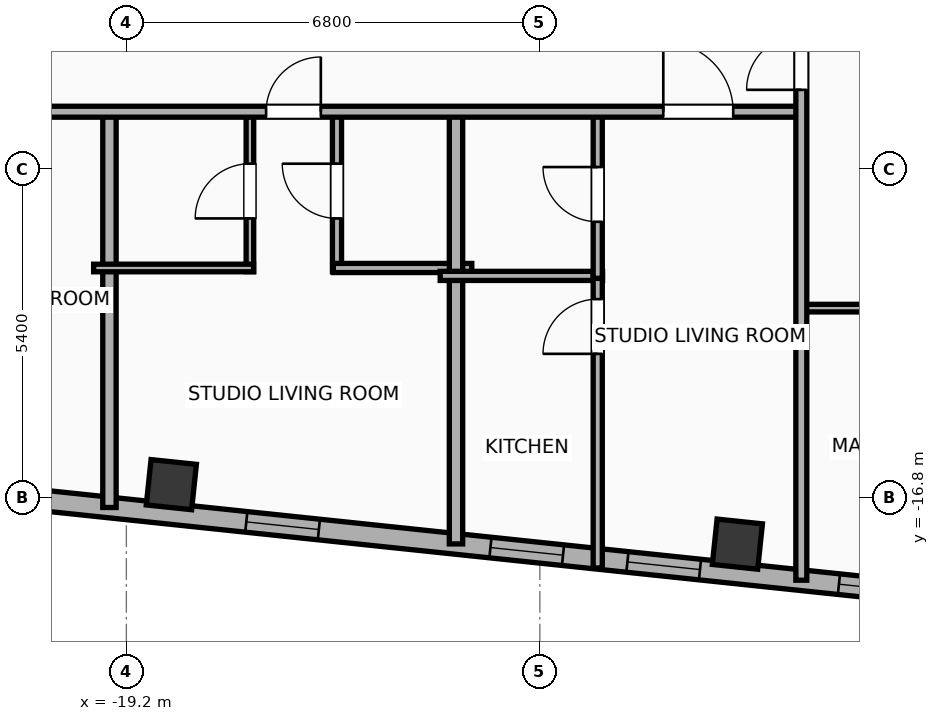
"""IFC4 building model, lengths in metres.
Left out: names, types, materials, properties, quantities, classifications, styles, units other than length and angle.
Written with IfcOpenShell. Run it as: python <this file> out.ifc"""

import sys

from ifc_helpers import new_model, si_unit, direction, frame, frame_2d, origin, origin_2d, place, context, subcontext, project, spatial, rectangle, hollow_rectangle, extrude, element, fill, save


model = new_model("IFC4")
c1 = context("Model", 3, precision=1e-05, world=origin(), true_north=direction((0.0, 1.0)))
c2 = subcontext(c1, "Body", "Model", "MODEL_VIEW")
j1 = project(units=[si_unit("LENGTHUNIT", "METRE"), si_unit("PLANEANGLEUNIT", "RADIAN")], contexts=[c1])
p1 = place(None, origin())
s1 = spatial("IfcSite", under=j1, at=p1, CompositionType="ELEMENT")
p2 = place(p1, origin())
s2 = spatial("IfcBuilding", under=s1, at=p2, CompositionType="ELEMENT")
p3 = place(p2, frame((0.0, 0.0, 302.9)))
s3 = spatial("IfcBuildingStorey", under=s2, at=p3, CompositionType="ELEMENT", Elevation=302.9)
for number, where, z_axis, x_axis in (
    (1, (-18.46, -16.583, 0.0), (0.0, 0.0, 1.0), (0.995, -0.105, 0.0)),
    (2, (-9.152, -17.561, 0.0), (0.0, 0.0, 1.0), (0.995, -0.105, 0.0)),
):
    element("IfcColumn", number, at=place(p3, frame(where, z_axis=z_axis, x_axis=x_axis)), inside=s3, PredefinedType="COLUMN", context=c2, shape_type="SweptSolid", body=[
        extrude(hollow_rectangle(XDim=0.75, YDim=0.75, WallThickness=0.025, at=origin_2d()), origin(), (0.0, 0.0, 1.0), 3.9),
    ])
p4 = place(p3, frame((18.708, -20.972, 0.0), z_axis=(0.0, 0.0, 1.0), x_axis=(-0.994521888554, 0.104528528102, 0.0)))
e3 = element("IfcWall", 3, at=p4, inside=s3, PredefinedType="ELEMENTEDWALL", context=c2, shape_type="SweptSolid", body=[
    extrude(rectangle(XDim=46.766, YDim=0.34, at=frame_2d((23.383, 0.0))), origin(), (0.0, 0.0, 1.0), 3.635),
])
p5 = place(p4, frame((23.733, 0.0, 0.65)))
e4 = element("IfcOpeningElement", 4, at=p5, cuts=e3, PredefinedType="OPENING", context=c2, shape_type="SweptSolid", body=[
    extrude(rectangle(XDim=2.6, YDim=2.45, at=frame_2d((1.3, 1.225))), frame((0.0, 0.18, 0.0), z_axis=(0.0, -1.0, 0.0), x_axis=(1.0, 0.0, 0.0)), (0.0, 0.0, 1.0), 0.36),
])
p6 = place(p4, frame((44.402, 0.0, 0.75)))
e5 = element("IfcOpeningElement", 5, at=p6, cuts=e3, PredefinedType="OPENING", context=c2, shape_type="SweptSolid", body=[
    extrude(rectangle(XDim=1.2, YDim=2.05, at=frame_2d((0.6, 1.025))), frame((0.0, 0.18, 0.0), z_axis=(0.0, -1.0, 0.0), x_axis=(1.0, 0.0, 0.0)), (0.0, 0.0, 1.0), 0.36),
])
p7 = place(p4, frame((39.54, 0.0, 0.75)))
e6 = element("IfcOpeningElement", 6, at=p7, cuts=e3, PredefinedType="OPENING", context=c2, shape_type="SweptSolid", body=[
    extrude(rectangle(XDim=1.2, YDim=2.05, at=frame_2d((0.6, 1.025))), frame((0.0, 0.18, 0.0), z_axis=(0.0, -1.0, 0.0), x_axis=(1.0, 0.0, 0.0)), (0.0, 0.0, 1.0), 0.36),
])
p8 = place(p4, frame((42.406, 0.0, 0.75)))
e7 = element("IfcOpeningElement", 7, at=p8, cuts=e3, PredefinedType="OPENING", context=c2, shape_type="SweptSolid", body=[
    extrude(rectangle(XDim=1.2, YDim=2.05, at=frame_2d((0.6, 1.025))), frame((0.0, 0.18, 0.0), z_axis=(0.0, -1.0, 0.0), x_axis=(1.0, 0.0, 0.0)), (0.0, 0.0, 1.0), 0.36),
])
p9 = place(p4, frame((34.933, 0.0, 0.75)))
e8 = element("IfcOpeningElement", 8, at=p9, cuts=e3, PredefinedType="OPENING", context=c2, shape_type="SweptSolid", body=[
    extrude(rectangle(XDim=1.2, YDim=2.05, at=frame_2d((0.6, 1.025))), frame((0.0, 0.18, 0.0), z_axis=(0.0, -1.0, 0.0), x_axis=(1.0, 0.0, 0.0)), (0.0, 0.0, 1.0), 0.36),
])
p10 = place(p4, frame((28.631, 0.0, 0.75)))
e9 = element("IfcOpeningElement", 9, at=p10, cuts=e3, PredefinedType="OPENING", context=c2, shape_type="SweptSolid", body=[
    extrude(rectangle(XDim=1.2, YDim=2.05, at=frame_2d((0.6, 1.025))), frame((0.0, 0.18, 0.0), z_axis=(0.0, -1.0, 0.0), x_axis=(1.0, 0.0, 0.0)), (0.0, 0.0, 1.0), 0.36),
])
p11 = place(p4, frame((30.896, 0.0, 0.75)))
e10 = element("IfcOpeningElement", 10, at=p11, cuts=e3, PredefinedType="OPENING", context=c2, shape_type="SweptSolid", body=[
    extrude(rectangle(XDim=1.2, YDim=2.05, at=frame_2d((0.6, 1.025))), frame((0.0, 0.18, 0.0), z_axis=(0.0, -1.0, 0.0), x_axis=(1.0, 0.0, 0.0)), (0.0, 0.0, 1.0), 0.36),
])
p12 = place(p4, frame((7.501, 0.0, 0.75)))
e11 = element("IfcOpeningElement", 11, at=p12, cuts=e3, PredefinedType="OPENING", context=c2, shape_type="SweptSolid", body=[
    extrude(rectangle(XDim=1.2, YDim=2.05, at=frame_2d((0.6, 1.025))), frame((0.0, 0.18, 0.0), z_axis=(0.0, -1.0, 0.0), x_axis=(1.0, 0.0, 0.0)), (0.0, 0.0, 1.0), 0.36),
])
p13 = place(p4, frame((4.159, 0.0, 0.75)))
e12 = element("IfcOpeningElement", 12, at=p13, cuts=e3, PredefinedType="OPENING", context=c2, shape_type="SweptSolid", body=[
    extrude(rectangle(XDim=1.2, YDim=2.05, at=frame_2d((0.6, 1.025))), frame((0.0, 0.18, 0.0), z_axis=(0.0, -1.0, 0.0), x_axis=(1.0, 0.0, 0.0)), (0.0, 0.0, 1.0), 0.36),
])
p14 = place(p4, frame((1.369, 0.0, 0.75)))
e13 = element("IfcOpeningElement", 13, at=p14, cuts=e3, PredefinedType="OPENING", context=c2, shape_type="SweptSolid", body=[
    extrude(rectangle(XDim=1.2, YDim=2.05, at=frame_2d((0.6, 1.025))), frame((0.0, 0.18, 0.0), z_axis=(0.0, -1.0, 0.0), x_axis=(1.0, 0.0, 0.0)), (0.0, 0.0, 1.0), 0.36),
])
p15 = place(p4, frame((20.254, 0.0, 0.75)))
e14 = element("IfcOpeningElement", 14, at=p15, cuts=e3, PredefinedType="OPENING", context=c2, shape_type="SweptSolid", body=[
    extrude(rectangle(XDim=1.2, YDim=2.05, at=frame_2d((0.6, 1.025))), frame((0.0, 0.18, 0.0), z_axis=(0.0, -1.0, 0.0), x_axis=(1.0, 0.0, 0.0)), (0.0, 0.0, 1.0), 0.36),
])
p16 = place(p4, frame((16.172, 0.0, 0.75)))
e15 = element("IfcOpeningElement", 15, at=p16, cuts=e3, PredefinedType="OPENING", context=c2, shape_type="SweptSolid", body=[
    extrude(rectangle(XDim=1.2, YDim=2.05, at=frame_2d((0.6, 1.025))), frame((0.0, 0.18, 0.0), z_axis=(0.0, -1.0, 0.0), x_axis=(1.0, 0.0, 0.0)), (0.0, 0.0, 1.0), 0.36),
])
p17 = place(p4, frame((12.11, 0.0, 0.75)))
e16 = element("IfcOpeningElement", 16, at=p17, cuts=e3, PredefinedType="OPENING", context=c2, shape_type="SweptSolid", body=[
    extrude(rectangle(XDim=1.2, YDim=2.05, at=frame_2d((0.6, 1.025))), frame((0.0, 0.18, 0.0), z_axis=(0.0, -1.0, 0.0), x_axis=(1.0, 0.0, 0.0)), (0.0, 0.0, 1.0), 0.36),
])
p18 = place(p3, frame((-19.478, -16.959, 0.0), z_axis=(0.0, 0.0, 1.0), x_axis=(0.0, 1.0, 0.0)))
e17 = element("IfcWall", 17, at=p18, inside=s3, PredefinedType="PARTITIONING", context=c2, shape_type="SweptSolid", body=[
    extrude(rectangle(XDim=6.589, YDim=0.22, at=frame_2d((3.294, 0.0))), origin(), (0.0, 0.0, 1.0), 3.635),
])
p19 = place(p3, frame((-17.168, -13.08, 0.0), z_axis=(0.0, 0.0, 1.0), x_axis=(0.0, 1.0, 0.0)))
e18 = element("IfcWall", 18, at=p19, inside=s3, PredefinedType="PARTITIONING", context=c2, shape_type="SweptSolid", body=[
    extrude(rectangle(XDim=2.65, YDim=0.125, at=frame_2d((1.325, 0.0))), origin(), (0.0, 0.0, 1.0), 3.635),
])
p20 = place(p19, frame((0.875, 0.0, 0.0)))
e19 = element("IfcOpeningElement", 19, at=p20, cuts=e18, PredefinedType="OPENING", context=c2, shape_type="SweptSolid", body=[
    extrude(rectangle(XDim=0.9, YDim=2.05, at=frame_2d((0.45, 1.025))), frame((0.0, 0.073, 0.0), z_axis=(0.0, -1.0, 0.0), x_axis=(1.0, 0.0, 0.0)), (0.0, 0.0, 1.0), 0.145),
])
p21 = place(p3, frame((-15.736, -13.08, 0.0), z_axis=(0.0, 0.0, 1.0), x_axis=(0.0, 1.0, 0.0)))
e20 = element("IfcWall", 20, at=p21, inside=s3, PredefinedType="PLUMBINGWALL", context=c2, shape_type="SweptSolid", body=[
    extrude(rectangle(XDim=2.65, YDim=0.15, at=frame_2d((1.325, 0.0))), origin(), (0.0, 0.0, 1.0), 3.635),
])
p22 = place(p21, frame((0.875, 0.0, 0.0)))
e21 = element("IfcOpeningElement", 21, at=p22, cuts=e20, PredefinedType="OPENING", context=c2, shape_type="SweptSolid", body=[
    extrude(rectangle(XDim=0.9, YDim=2.05, at=frame_2d((0.45, 1.025))), frame((0.0, 0.085, 0.0), z_axis=(0.0, -1.0, 0.0), x_axis=(1.0, 0.0, 0.0)), (0.0, 0.0, 1.0), 0.17),
])
p23 = place(p3, frame((-19.738, -13.02, 0.0), z_axis=(0.0, 0.0, 1.0), x_axis=(1.0, 0.0, 0.0)))
e22 = element("IfcWall", 22, at=p23, inside=s3, PredefinedType="PARTITIONING", context=c2, shape_type="SweptSolid", body=[
    extrude(rectangle(XDim=2.63, YDim=0.125, at=frame_2d((1.315, 0.0))), origin(), (0.0, 0.0, 1.0), 3.635),
])
p24 = place(p3, frame((-15.796, -13.02, 0.0), z_axis=(0.0, 0.0, 1.0), x_axis=(1.0, 0.0, 0.0)))
e23 = element("IfcWall", 23, at=p24, inside=s3, PredefinedType="PLUMBINGWALL", context=c2, shape_type="SweptSolid", body=[
    extrude(rectangle(XDim=2.277, YDim=0.15, at=frame_2d((1.138, 0.0))), origin(), (0.0, 0.0, 1.0), 3.635),
])
p25 = place(p3, frame((-13.779, -17.558, 0.0), z_axis=(0.0, 0.0, 1.0), x_axis=(0.0, 1.0, 0.0)))
e24 = element("IfcWall", 24, at=p25, inside=s3, PredefinedType="PARTITIONING", context=c2, shape_type="SweptSolid", body=[
    extrude(rectangle(XDim=7.188, YDim=0.22, at=frame_2d((3.594, 0.0))), origin(), (0.0, 0.0, 1.0), 3.635),
])
p26 = place(p3, frame((-14.039, -13.15, 0.0), z_axis=(0.0, 0.0, 1.0), x_axis=(1.0, 0.0, 0.0)))
e25 = element("IfcWall", 25, at=p26, inside=s3, PredefinedType="PLUMBINGWALL", context=c2, shape_type="SweptSolid", body=[
    extrude(rectangle(XDim=2.671, YDim=0.15, at=frame_2d((1.335, 0.0))), origin(), (0.0, 0.0, 1.0), 3.635),
])
p27 = place(p3, frame((-11.448, -17.954, 0.0), z_axis=(0.0, 0.0, 1.0), x_axis=(0.0, 1.0, 0.0)))
e26 = element("IfcWall", 26, at=p27, inside=s3, PredefinedType="PLUMBINGWALL", context=c2, shape_type="SweptSolid", body=[
    extrude(rectangle(XDim=4.844, YDim=0.15, at=frame_2d((2.422, 0.0))), origin(), (0.0, 0.0, 1.0), 3.635),
])
p28 = place(p27, frame((3.522, 0.0, 0.0)))
e27 = element("IfcOpeningElement", 27, at=p28, cuts=e26, PredefinedType="OPENING", context=c2, shape_type="SweptSolid", body=[
    extrude(rectangle(XDim=0.9, YDim=2.05, at=frame_2d((0.45, 1.025))), frame((0.0, 0.085, 0.0), z_axis=(0.0, -1.0, 0.0), x_axis=(1.0, 0.0, 0.0)), (0.0, 0.0, 1.0), 0.17),
])
p29 = place(p3, frame((-11.448, -13.19, 0.0), z_axis=(0.0, 0.0, 1.0), x_axis=(0.0, 1.0, 0.0)))
e28 = element("IfcWall", 28, at=p29, inside=s3, PredefinedType="PLUMBINGWALL", context=c2, shape_type="SweptSolid", body=[
    extrude(rectangle(XDim=2.76, YDim=0.15, at=frame_2d((1.38, 0.0))), origin(), (0.0, 0.0, 1.0), 3.075),
])
p30 = place(p29, frame((0.93, 0.0, 0.0)))
e29 = element("IfcOpeningElement", 29, at=p30, cuts=e28, PredefinedType="OPENING", context=c2, shape_type="SweptSolid", body=[
    extrude(rectangle(XDim=0.9, YDim=2.05, at=frame_2d((0.45, 1.025))), frame((0.0, 0.085, 0.0), z_axis=(0.0, -1.0, 0.0), x_axis=(1.0, 0.0, 0.0)), (0.0, 0.0, 1.0), 0.17),
])
p31 = place(p3, frame((-30.676, -10.45, 0.0), z_axis=(0.0, 0.0, 1.0), x_axis=(1.0, 0.0, 0.0)))
e30 = element("IfcWall", 30, at=p31, inside=s3, PredefinedType="PARTITIONING", context=c2, shape_type="SweptSolid", body=[
    extrude(rectangle(XDim=22.596, YDim=0.18, at=frame_2d((11.298, 0.0))), origin(), (0.0, 0.0, 1.0), 3.635),
])
p32 = place(p31, frame((2.336, 0.0, 0.0)))
e31 = element("IfcOpeningElement", 31, at=p32, cuts=e30, PredefinedType="OPENING", context=c2, shape_type="SweptSolid", body=[
    extrude(rectangle(XDim=0.9, YDim=2.05, at=frame_2d((0.45, 1.025))), frame((0.0, 0.1, 0.0), z_axis=(0.0, -1.0, 0.0), x_axis=(1.0, 0.0, 0.0)), (0.0, 0.0, 1.0), 0.2),
])
p33 = place(p31, frame((8.861, 0.0, 0.0)))
e32 = element("IfcOpeningElement", 32, at=p33, cuts=e30, PredefinedType="OPENING", context=c2, shape_type="SweptSolid", body=[
    extrude(rectangle(XDim=1.15, YDim=2.05, at=frame_2d((0.575, 1.025))), frame((0.0, 0.1, 0.0), z_axis=(0.0, -1.0, 0.0), x_axis=(1.0, 0.0, 0.0)), (0.0, 0.0, 1.0), 0.2),
])
p34 = place(p31, frame((13.774, 0.0, 0.0)))
e33 = element("IfcOpeningElement", 33, at=p34, cuts=e30, PredefinedType="OPENING", context=c2, shape_type="SweptSolid", body=[
    extrude(rectangle(XDim=0.9, YDim=2.05, at=frame_2d((0.45, 1.025))), frame((0.0, 0.1, 0.0), z_axis=(0.0, -1.0, 0.0), x_axis=(1.0, 0.0, 0.0)), (0.0, 0.0, 1.0), 0.2),
])
p35 = place(p31, frame((20.306, 0.0, 0.0)))
e34 = element("IfcOpeningElement", 34, at=p35, cuts=e30, PredefinedType="OPENING", context=c2, shape_type="SweptSolid", body=[
    extrude(rectangle(XDim=1.15, YDim=2.05, at=frame_2d((0.575, 1.025))), frame((0.0, 0.1, 0.0), z_axis=(0.0, -1.0, 0.0), x_axis=(1.0, 0.0, 0.0)), (0.0, 0.0, 1.0), 0.2),
])
p36 = place(p3, frame((-8.08, -13.68, 0.0), z_axis=(0.0, 0.0, 1.0), x_axis=(1.0, 0.0, 0.0)))
e35 = element("IfcWall", 35, at=p36, inside=s3, PredefinedType="PARTITIONING", context=c2, shape_type="SweptSolid", body=[
    extrude(rectangle(XDim=8.06, YDim=0.125, at=frame_2d((4.03, 0.0))), origin(), (0.0, 0.0, 1.0), 3.635),
])
p37 = place(p36, frame((1.323, 0.0, 0.0)))
e36 = element("IfcOpeningElement", 36, at=p37, cuts=e35, PredefinedType="OPENING", context=c2, shape_type="SweptSolid", body=[
    extrude(rectangle(XDim=0.9, YDim=2.05, at=frame_2d((0.45, 1.025))), frame((0.0, 0.073, 0.0), z_axis=(0.0, -1.0, 0.0), x_axis=(1.0, 0.0, 0.0)), (0.0, 0.0, 1.0), 0.145),
])
p38 = place(p36, frame((4.547, 0.0, 0.0)))
e37 = element("IfcOpeningElement", 37, at=p38, cuts=e35, PredefinedType="OPENING", context=c2, shape_type="SweptSolid", body=[
    extrude(rectangle(XDim=0.9, YDim=2.05, at=frame_2d((0.45, 1.025))), frame((0.0, 0.073, 0.0), z_axis=(0.0, -1.0, 0.0), x_axis=(1.0, 0.0, 0.0)), (0.0, 0.0, 1.0), 0.145),
])
p39 = place(p3, frame((-8.1, -18.155, 0.0), z_axis=(0.0, 0.0, 1.0), x_axis=(0.0, 1.0, 0.0)))
e38 = element("IfcWall", 38, at=p39, inside=s3, PredefinedType="PARTITIONING", context=c2, shape_type="SweptSolid", body=[
    extrude(rectangle(XDim=9.314, YDim=0.18, at=frame_2d((4.657, 0.0))), origin(), (0.0, 0.0, 1.0), 3.635),
])
p40 = place(p39, frame((8.064, 0.0, 0.0)))
e39 = element("IfcOpeningElement", 39, at=p40, cuts=e38, PredefinedType="OPENING", context=c2, shape_type="SweptSolid", body=[
    extrude(rectangle(XDim=0.9, YDim=2.05, at=frame_2d((0.45, 1.025))), frame((0.0, 0.1, 0.0), z_axis=(0.0, -1.0, 0.0), x_axis=(1.0, 0.0, 0.0)), (0.0, 0.0, 1.0), 0.2),
])
p41 = place(p5, origin())
e40 = element("IfcWindow", 40, at=p41, inside=s3, PartitioningType="SINGLE_PANEL", PredefinedType="WINDOW", context=c2, shape_type="SweptSolid", body=[
    extrude(rectangle(XDim=2.6, YDim=2.45, at=frame_2d((1.3, 1.225))), frame((0.0, 0.03, 0.0), z_axis=(0.0, -1.0, 0.0), x_axis=(1.0, 0.0, 0.0)), (0.0, 0.0, 1.0), 0.06),
])
fill(e4, e40)
p42 = place(p9, origin())
e41 = element("IfcWindow", 41, at=p42, inside=s3, PartitioningType="SINGLE_PANEL", PredefinedType="WINDOW", context=c2, shape_type="SweptSolid", body=[
    extrude(rectangle(XDim=1.2, YDim=2.05, at=frame_2d((0.6, 1.025))), frame((0.0, 0.03, 0.0), z_axis=(0.0, -1.0, 0.0), x_axis=(1.0, 0.0, 0.0)), (0.0, 0.0, 1.0), 0.06),
])
fill(e8, e41)
p43 = place(p10, origin())
e42 = element("IfcWindow", 42, at=p43, inside=s3, PartitioningType="SINGLE_PANEL", PredefinedType="WINDOW", context=c2, shape_type="SweptSolid", body=[
    extrude(rectangle(XDim=1.2, YDim=2.05, at=frame_2d((0.6, 1.025))), frame((0.0, 0.03, 0.0), z_axis=(0.0, -1.0, 0.0), x_axis=(1.0, 0.0, 0.0)), (0.0, 0.0, 1.0), 0.06),
])
fill(e9, e42)
p44 = place(p11, origin())
e43 = element("IfcWindow", 43, at=p44, inside=s3, PartitioningType="SINGLE_PANEL", PredefinedType="WINDOW", context=c2, shape_type="SweptSolid", body=[
    extrude(rectangle(XDim=1.2, YDim=2.05, at=frame_2d((0.6, 1.025))), frame((0.0, 0.03, 0.0), z_axis=(0.0, -1.0, 0.0), x_axis=(1.0, 0.0, 0.0)), (0.0, 0.0, 1.0), 0.06),
])
fill(e10, e43)
p45 = place(p20, origin())
e44 = element("IfcDoor", 44, at=p45, inside=s3, OperationType="SINGLE_SWING_LEFT", PredefinedType="DOOR", context=c2, shape_type="SweptSolid", body=[
    extrude(rectangle(XDim=0.9, YDim=2.05, at=frame_2d((0.45, 1.025))), frame((0.0, 0.025, 0.0), z_axis=(0.0, -1.0, 0.0), x_axis=(1.0, 0.0, 0.0)), (0.0, 0.0, 1.0), 0.05),
])
fill(e19, e44)
p46 = place(p22, origin())
e45 = element("IfcDoor", 45, at=p46, inside=s3, OperationType="SINGLE_SWING_RIGHT", PredefinedType="DOOR", context=c2, shape_type="SweptSolid", body=[
    extrude(rectangle(XDim=0.9, YDim=2.05, at=frame_2d((0.45, 1.025))), frame((0.0, 0.025, 0.0), z_axis=(0.0, -1.0, 0.0), x_axis=(1.0, 0.0, 0.0)), (0.0, 0.0, 1.0), 0.05),
])
fill(e21, e45)
p47 = place(p28, origin())
e46 = element("IfcDoor", 46, at=p47, inside=s3, OperationType="SINGLE_SWING_LEFT", PredefinedType="DOOR", context=c2, shape_type="SweptSolid", body=[
    extrude(rectangle(XDim=0.9, YDim=2.05, at=frame_2d((0.45, 1.025))), frame((0.0, 0.025, 0.0), z_axis=(0.0, -1.0, 0.0), x_axis=(1.0, 0.0, 0.0)), (0.0, 0.0, 1.0), 0.05),
])
fill(e27, e46)
p48 = place(p30, origin())
e47 = element("IfcDoor", 47, at=p48, inside=s3, OperationType="SINGLE_SWING_RIGHT", PredefinedType="DOOR", context=c2, shape_type="SweptSolid", body=[
    extrude(rectangle(XDim=0.9, YDim=2.05, at=frame_2d((0.45, 1.025))), frame((0.0, 0.025, 0.0), z_axis=(0.0, -1.0, 0.0), x_axis=(1.0, 0.0, 0.0)), (0.0, 0.0, 1.0), 0.05),
])
fill(e29, e47)
p49 = place(p34, origin())
e48 = element("IfcDoor", 48, at=p49, inside=s3, OperationType="SINGLE_SWING_RIGHT", PredefinedType="DOOR", context=c2, shape_type="SweptSolid", body=[
    extrude(rectangle(XDim=0.9, YDim=2.05, at=frame_2d((0.45, 1.025))), frame((0.0, 0.025, 0.0), z_axis=(0.0, -1.0, 0.0), x_axis=(1.0, 0.0, 0.0)), (0.0, 0.0, 1.0), 0.05),
])
fill(e33, e48)
p50 = place(p35, origin())
e49 = element("IfcDoor", 49, at=p50, inside=s3, OperationType="SINGLE_SWING_LEFT", PredefinedType="DOOR", context=c2, shape_type="SweptSolid", body=[
    extrude(rectangle(XDim=1.15, YDim=2.05, at=frame_2d((0.575, 1.025))), frame((0.0, 0.025, 0.0), z_axis=(0.0, -1.0, 0.0), x_axis=(1.0, 0.0, 0.0)), (0.0, 0.0, 1.0), 0.05),
])
fill(e34, e49)
p51 = place(p40, origin())
e50 = element("IfcDoor", 50, at=p51, inside=s3, OperationType="SINGLE_SWING_LEFT", PredefinedType="DOOR", context=c2, shape_type="SweptSolid", body=[
    extrude(rectangle(XDim=0.9, YDim=2.05, at=frame_2d((0.45, 1.025))), frame((0.0, 0.025, 0.0), z_axis=(0.0, -1.0, 0.0), x_axis=(1.0, 0.0, 0.0)), (0.0, 0.0, 1.0), 0.05),
])
fill(e39, e50)
save(model, sys.argv[1])
